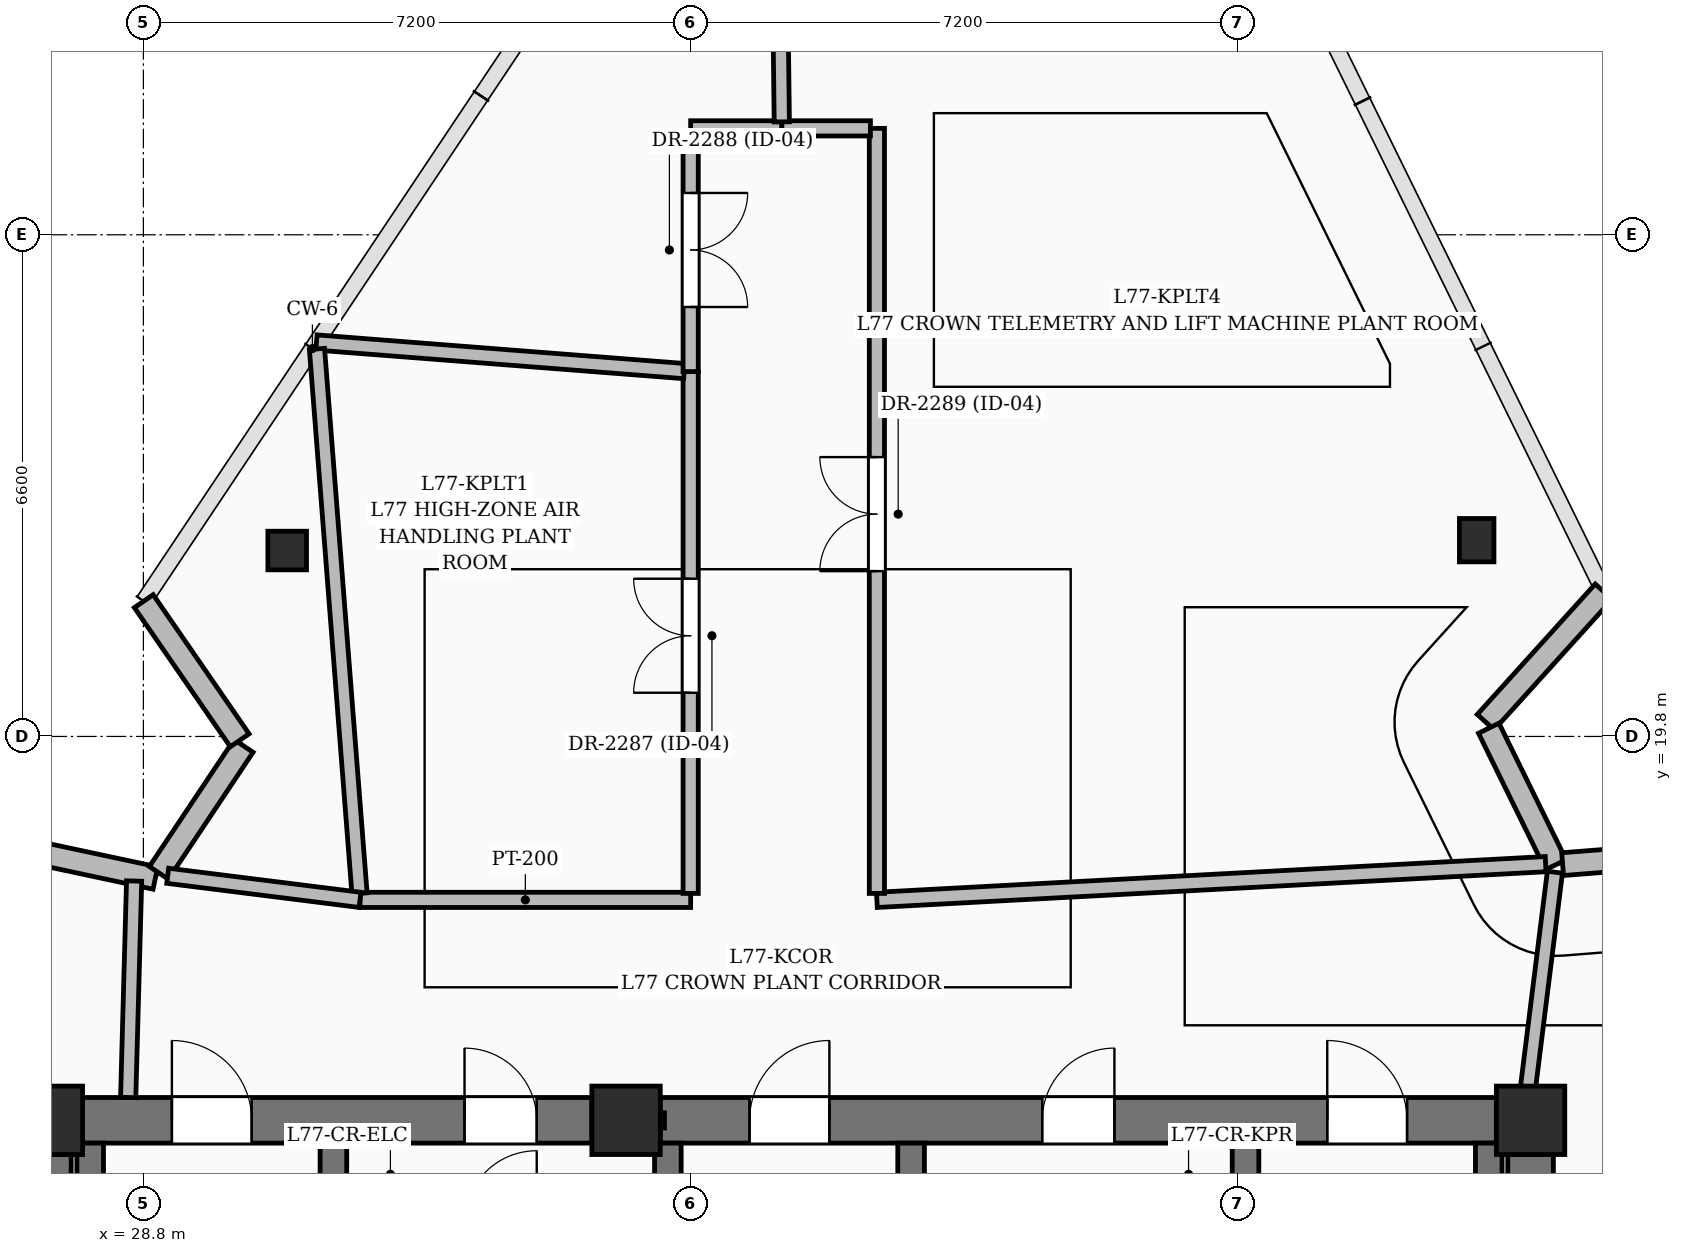
"""IFC4 building model, lengths in metres.
Left out: names, types, materials, properties, quantities, classifications, styles, units other than length and angle.
Written with IfcOpenShell. Run it as: python <this file> out.ifc"""

import sys

from ifc_helpers import new_model, si_unit, direction, frame, frame_2d, origin, origin_2d, place, context, subcontext, project, spatial, rectangle, hollow_circle, i_section, extrude, element, fill, save


model = new_model("IFC4")
c1 = context("Model", 3, precision=1e-05, world=origin(), true_north=direction((0.0, 1.0)))
c2 = subcontext(c1, "Body", "Model", "MODEL_VIEW")
j1 = project(units=[si_unit("LENGTHUNIT", "METRE"), si_unit("PLANEANGLEUNIT", "RADIAN")], contexts=[c1])
p1 = place(None, origin())
s1 = spatial("IfcSite", under=j1, at=p1, CompositionType="ELEMENT")
p2 = place(p1, origin())
s2 = spatial("IfcBuilding", under=s1, at=p2, CompositionType="ELEMENT")
p3 = place(p2, frame((0.0, 0.0, 298.5)))
s3 = spatial("IfcBuildingStorey", under=s2, at=p3, CompositionType="ELEMENT", Elevation=298.5)
for number, where, z_axis, x_axis in (
    (1, (27.55, 14.75, 0.0), (0.0, 0.0, 1.0), (1.0, 0.0, 0.0)),
    (2, (35.15, 14.75, 0.0), (0.0, 0.0, 1.0), (1.0, 0.0, 0.0)),
    (3, (47.05, 14.75, 0.0), (0.0, 0.0, 1.0), (1.0, 0.0, 0.0)),
):
    element("IfcColumn", number, at=place(p3, frame(where, z_axis=z_axis, x_axis=x_axis)), inside=s3, PredefinedType="COLUMN", context=c2, shape_type="SweptSolid", body=[
        extrude(rectangle(XDim=0.9, YDim=0.9, at=origin_2d()), origin(), (0.0, 0.0, 1.0), 4.0),
    ])
p4 = place(p3, frame((28.0, 14.75, 0.0), z_axis=(0.0, 0.0, 1.0), x_axis=(1.0, 0.0, 0.0)))
e4 = element("IfcWall", 4, at=p4, inside=s3, PredefinedType="SHEAR", context=c2, shape_type="SweptSolid", body=[
    extrude(rectangle(XDim=6.7, YDim=0.6, at=frame_2d((3.35, 0.0))), origin(), (0.0, 0.0, 1.0), 4.0),
])
p5 = place(p4, frame((1.175, 0.0, 0.0)))
e5 = element("IfcOpeningElement", 5, at=p5, cuts=e4, PredefinedType="OPENING", context=c2, shape_type="SweptSolid", body=[
    extrude(rectangle(XDim=1.05, YDim=2.15, at=frame_2d((0.525, 1.075))), frame((0.0, 0.31, 0.0), z_axis=(0.0, -1.0, 0.0), x_axis=(1.0, 0.0, 0.0)), (0.0, 0.0, 1.0), 0.62),
])
p6 = place(p4, frame((5.025, 0.0, 0.0)))
e6 = element("IfcOpeningElement", 6, at=p6, cuts=e4, PredefinedType="OPENING", context=c2, shape_type="SweptSolid", body=[
    extrude(rectangle(XDim=0.95, YDim=2.15, at=frame_2d((0.475, 1.075))), frame((0.0, 0.31, 0.0), z_axis=(0.0, -1.0, 0.0), x_axis=(1.0, 0.0, 0.0)), (0.0, 0.0, 1.0), 0.62),
])
p7 = place(p3, frame((35.6, 14.75, 0.0), z_axis=(0.0, 0.0, 1.0), x_axis=(1.0, 0.0, 0.0)))
e7 = element("IfcWall", 7, at=p7, inside=s3, PredefinedType="SHEAR", context=c2, shape_type="SweptSolid", body=[
    extrude(rectangle(XDim=11.0, YDim=0.6, at=frame_2d((5.5, 0.0))), origin(), (0.0, 0.0, 1.0), 4.0),
])
p8 = place(p7, frame((1.175, 0.0, 0.0)))
e8 = element("IfcOpeningElement", 8, at=p8, cuts=e7, PredefinedType="OPENING", context=c2, shape_type="SweptSolid", body=[
    extrude(rectangle(XDim=1.05, YDim=2.15, at=frame_2d((0.525, 1.075))), frame((0.0, 0.31, 0.0), z_axis=(0.0, -1.0, 0.0), x_axis=(1.0, 0.0, 0.0)), (0.0, 0.0, 1.0), 0.62),
])
p9 = place(p7, frame((8.775, 0.0, 0.0)))
e9 = element("IfcOpeningElement", 9, at=p9, cuts=e7, PredefinedType="OPENING", context=c2, shape_type="SweptSolid", body=[
    extrude(rectangle(XDim=1.05, YDim=2.15, at=frame_2d((0.525, 1.075))), frame((0.0, 0.31, 0.0), z_axis=(0.0, -1.0, 0.0), x_axis=(1.0, 0.0, 0.0)), (0.0, 0.0, 1.0), 0.62),
])
p10 = place(p7, frame((5.025, 0.0, 0.0)))
e10 = element("IfcOpeningElement", 10, at=p10, cuts=e7, PredefinedType="OPENING", context=c2, shape_type="SweptSolid", body=[
    extrude(rectangle(XDim=0.95, YDim=2.15, at=frame_2d((0.475, 1.075))), frame((0.0, 0.31, 0.0), z_axis=(0.0, -1.0, 0.0), x_axis=(1.0, 0.0, 0.0)), (0.0, 0.0, 1.0), 0.62),
])
for number, where, z_axis, x_axis in (
    (11, (27.55, 5.0, 0.0), (0.0, 0.0, 1.0), (0.0, 1.0, 0.0)),
    (12, (47.05, 5.0, 0.0), (0.0, 0.0, 1.0), (0.0, 1.0, 0.0)),
):
    element("IfcWall", number, at=place(p3, frame(where, z_axis=z_axis, x_axis=x_axis)), inside=s3, PredefinedType="SHEAR", context=c2, shape_type="SweptSolid", body=[
        extrude(rectangle(XDim=9.3, YDim=0.6, at=frame_2d((4.65, 0.0))), origin(), (0.0, 0.0, 1.0), 4.0),
    ])
p11 = place(p3, frame((28.1, 5.2, 0.0), z_axis=(0.0, 0.0, 1.0), x_axis=(0.0, 1.0, 0.0)))
e13 = element("IfcWall", 13, at=p11, inside=s3, PredefinedType="SOLIDWALL", context=c2, shape_type="SweptSolid", body=[
    extrude(rectangle(XDim=9.25, YDim=0.35, at=frame_2d((4.625, 0.0))), origin(), (0.0, 0.0, 1.0), 4.0),
])
p12 = place(p3, frame((31.3, 5.2, 0.0), z_axis=(0.0, 0.0, 1.0), x_axis=(0.0, 1.0, 0.0)))
e14 = element("IfcWall", 14, at=p12, inside=s3, PredefinedType="SOLIDWALL", context=c2, shape_type="SweptSolid", body=[
    extrude(rectangle(XDim=9.25, YDim=0.35, at=frame_2d((4.625, 0.0))), origin(), (0.0, 0.0, 1.0), 4.0),
])
p13 = place(p12, frame((6.95, 0.0, 0.0)))
e15 = element("IfcOpeningElement", 15, at=p13, cuts=e14, PredefinedType="OPENING", context=c2, shape_type="SweptSolid", body=[
    extrude(rectangle(XDim=1.0, YDim=2.15, at=frame_2d((0.5, 1.075))), frame((0.0, 0.185, 0.0), z_axis=(0.0, -1.0, 0.0), x_axis=(1.0, 0.0, 0.0)), (0.0, 0.0, 1.0), 0.37),
])
p14 = place(p3, frame((35.7, 5.2, 0.0), z_axis=(0.0, 0.0, 1.0), x_axis=(0.0, 1.0, 0.0)))
e16 = element("IfcWall", 16, at=p14, inside=s3, PredefinedType="SOLIDWALL", context=c2, shape_type="SweptSolid", body=[
    extrude(rectangle(XDim=9.25, YDim=0.35, at=frame_2d((4.625, 0.0))), origin(), (0.0, 0.0, 1.0), 4.0),
])
p15 = place(p14, frame((6.95, 0.0, 0.0)))
e17 = element("IfcOpeningElement", 17, at=p15, cuts=e16, PredefinedType="OPENING", context=c2, shape_type="SweptSolid", body=[
    extrude(rectangle(XDim=1.0, YDim=2.15, at=frame_2d((0.5, 1.075))), frame((0.0, 0.185, 0.0), z_axis=(0.0, -1.0, 0.0), x_axis=(1.0, 0.0, 0.0)), (0.0, 0.0, 1.0), 0.37),
])
p16 = place(p3, frame((38.9, 5.2, 0.0), z_axis=(0.0, 0.0, 1.0), x_axis=(0.0, 1.0, 0.0)))
e18 = element("IfcWall", 18, at=p16, inside=s3, PredefinedType="SOLIDWALL", context=c2, shape_type="SweptSolid", body=[
    extrude(rectangle(XDim=9.25, YDim=0.35, at=frame_2d((4.625, 0.0))), origin(), (0.0, 0.0, 1.0), 4.0),
])
p17 = place(p16, frame((6.95, 0.0, 0.0)))
e19 = element("IfcOpeningElement", 19, at=p17, cuts=e18, PredefinedType="OPENING", context=c2, shape_type="SweptSolid", body=[
    extrude(rectangle(XDim=1.0, YDim=2.15, at=frame_2d((0.5, 1.075))), frame((0.0, 0.185, 0.0), z_axis=(0.0, -1.0, 0.0), x_axis=(1.0, 0.0, 0.0)), (0.0, 0.0, 1.0), 0.37),
])
p18 = place(p3, frame((43.3, 5.2, 0.0), z_axis=(0.0, 0.0, 1.0), x_axis=(0.0, 1.0, 0.0)))
e20 = element("IfcWall", 20, at=p18, inside=s3, PredefinedType="SOLIDWALL", context=c2, shape_type="SweptSolid", body=[
    extrude(rectangle(XDim=9.25, YDim=0.35, at=frame_2d((4.625, 0.0))), origin(), (0.0, 0.0, 1.0), 4.0),
])
p19 = place(p18, frame((6.95, 0.0, 0.0)))
e21 = element("IfcOpeningElement", 21, at=p19, cuts=e20, PredefinedType="OPENING", context=c2, shape_type="SweptSolid", body=[
    extrude(rectangle(XDim=1.0, YDim=2.15, at=frame_2d((0.5, 1.075))), frame((0.0, 0.185, 0.0), z_axis=(0.0, -1.0, 0.0), x_axis=(1.0, 0.0, 0.0)), (0.0, 0.0, 1.0), 0.37),
])
p20 = place(p3, frame((46.5, 5.2, 0.0), z_axis=(0.0, 0.0, 1.0), x_axis=(0.0, 1.0, 0.0)))
e22 = element("IfcWall", 22, at=p20, inside=s3, PredefinedType="SOLIDWALL", context=c2, shape_type="SweptSolid", body=[
    extrude(rectangle(XDim=9.25, YDim=0.35, at=frame_2d((4.625, 0.0))), origin(), (0.0, 0.0, 1.0), 4.0),
])
p21 = place(p3, frame((46.341, 22.382, 0.0), z_axis=(0.0, 0.0, 1.0), x_axis=(1.0, 0.0, 0.0)))
e23 = element("IfcColumn", 23, at=p21, inside=s3, PredefinedType="COLUMN", context=c2, shape_type="SweptSolid", body=[
    extrude(i_section(OverallWidth=0.454, OverallDepth=0.57, WebThickness=0.078, FlangeThickness=0.094, FilletRadius=0.02, at=origin_2d()), origin(), (0.0, 0.0, 1.0), 4.0),
])
p22 = place(p3, frame((30.692, 22.246, 0.0), z_axis=(0.0, 0.0, 1.0), x_axis=(1.0, 0.0, 0.0)))
e24 = element("IfcColumn", 24, at=p22, inside=s3, PredefinedType="COLUMN", context=c2, shape_type="SweptSolid", body=[
    extrude(hollow_circle(Radius=0.254, WallThickness=0.016, at=origin_2d()), origin(), (0.0, 0.0, 1.0), 4.0),
])
p23 = place(p3, frame((26.695, 18.42, 0.0), z_axis=(0.0, 0.0, 1.0), x_axis=(0.977979629917, -0.208700367675, 0.0)))
e25 = element("IfcWall", 25, at=p23, inside=s3, PredefinedType="SOLIDWALL", context=c2, shape_type="SweptSolid", body=[
    extrude(rectangle(XDim=2.314, YDim=0.3, at=frame_2d((1.157, 0.0))), origin(), (0.0, 0.0, 1.0), 2.982),
])
p24 = place(p3, frame((29.003, 18.005, 0.0), z_axis=(0.0, 0.0, 1.0), x_axis=(0.555121061255, 0.831769563852, 0.0)))
e26 = element("IfcWall", 26, at=p24, inside=s3, PredefinedType="SOLIDWALL", context=c2, shape_type="SweptSolid", body=[
    extrude(rectangle(XDim=2.008, YDim=0.3, at=frame_2d((1.004, 0.0))), origin(), (0.0, 0.0, 1.0), 3.04),
])
p25 = place(p3, frame((30.067, 19.749, 0.0), z_axis=(0.0, 0.0, 1.0), x_axis=(-0.567478945793, 0.823387907418, 0.0)))
e27 = element("IfcWall", 27, at=p25, inside=s3, PredefinedType="SOLIDWALL", context=c2, shape_type="SweptSolid", body=[
    extrude(rectangle(XDim=2.224, YDim=0.3, at=frame_2d((1.112, 0.0))), origin(), (0.0, 0.0, 1.0), 2.982),
])
p26 = place(p3, frame((48.012, 21.705, 0.0), z_axis=(0.0, 0.0, 1.0), x_axis=(-0.670764114694, -0.741670750697, 0.0)))
e28 = element("IfcWall", 28, at=p26, inside=s3, PredefinedType="SOLIDWALL", context=c2, shape_type="SweptSolid", body=[
    extrude(rectangle(XDim=2.314, YDim=0.3, at=frame_2d((1.157, 0.0))), origin(), (0.0, 0.0, 1.0), 2.982),
])
p27 = place(p3, frame((46.5, 19.908, 0.0), z_axis=(0.0, 0.0, 1.0), x_axis=(0.441100522221, -0.897457703346, 0.0)))
e29 = element("IfcWall", 29, at=p27, inside=s3, PredefinedType="SOLIDWALL", context=c2, shape_type="SweptSolid", body=[
    extrude(rectangle(XDim=2.0, YDim=0.3, at=frame_2d((1.0, 0.0))), origin(), (0.0, 0.0, 1.0), 3.04),
])
p28 = place(p3, frame((47.472, 18.12, 0.0), z_axis=(0.0, 0.0, 1.0), x_axis=(0.99690404097, 0.078627813762, 0.0)))
e30 = element("IfcWall", 30, at=p28, inside=s3, PredefinedType="SOLIDWALL", context=c2, shape_type="SweptSolid", body=[
    extrude(rectangle(XDim=2.223, YDim=0.3, at=frame_2d((1.112, 0.0))), origin(), (0.0, 0.0, 1.0), 2.982),
])
p29 = place(p3, frame((34.72, 14.75, 0.0), z_axis=(0.0, 0.0, 1.0), x_axis=(1.0, 0.0, 0.0)))
e31 = element("IfcWall", 31, at=p29, inside=s3, PredefinedType="PARTITIONING", context=c2, shape_type="SweptSolid", body=[
    extrude(rectangle(XDim=0.935, YDim=0.2, at=frame_2d((0.468, 0.0))), origin(), (0.0, 0.0, 1.0), 2.885),
])
p30 = place(p3, frame((31.65, 17.65, 0.0), z_axis=(0.0, 0.0, 1.0), x_axis=(1.0, 0.0, 0.0)))
e32 = element("IfcWall", 32, at=p30, inside=s3, PredefinedType="PARTITIONING", context=c2, shape_type="SweptSolid", body=[
    extrude(rectangle(XDim=4.35, YDim=0.2, at=frame_2d((2.175, 0.0))), origin(), (0.0, 0.0, 1.0), 3.035),
])
p31 = place(p3, frame((36.0, 17.735, 0.0), z_axis=(0.0, 0.0, 1.0), x_axis=(0.0, 1.0, 0.0)))
e33 = element("IfcWall", 33, at=p31, inside=s3, PredefinedType="PARTITIONING", context=c2, shape_type="SweptSolid", body=[
    extrude(rectangle(XDim=6.865, YDim=0.2, at=frame_2d((3.433, 0.0))), origin(), (0.0, 0.0, 1.0), 3.062),
])
p32 = place(p31, frame((2.64, 0.0, 0.0)))
e34 = element("IfcOpeningElement", 34, at=p32, cuts=e33, PredefinedType="OPENING", context=c2, shape_type="SweptSolid", body=[
    extrude(rectangle(XDim=1.5, YDim=2.2, at=frame_2d((0.75, 1.1))), frame((0.0, 0.11, 0.0), z_axis=(0.0, -1.0, 0.0), x_axis=(1.0, 0.0, 0.0)), (0.0, 0.0, 1.0), 0.22),
])
p33 = place(p3, frame((35.915, 24.607, 0.0), z_axis=(0.0, 0.0, 1.0), x_axis=(-0.996990518467, 0.077523584063, 0.0)))
e35 = element("IfcWall", 35, at=p33, inside=s3, PredefinedType="PARTITIONING", context=c2, shape_type="SweptSolid", body=[
    extrude(rectangle(XDim=4.853, YDim=0.2, at=frame_2d((2.427, 0.0))), origin(), (0.0, 0.0, 1.0), 2.977),
])
p34 = place(p3, frame((31.083, 24.898, 0.0), z_axis=(0.0, 0.0, 1.0), x_axis=(0.077909829575, -0.996960409673, 0.0)))
e36 = element("IfcWall", 36, at=p34, inside=s3, PredefinedType="PARTITIONING", context=c2, shape_type="SweptSolid", body=[
    extrude(rectangle(XDim=7.185, YDim=0.2, at=frame_2d((3.593, 0.0))), origin(), (0.0, 0.0, 1.0), 2.977),
])
p35 = place(p3, frame((31.65, 17.65, 0.0), z_axis=(0.0, 0.0, 1.0), x_axis=(-0.992233618203, 0.124388290875, 0.0)))
e37 = element("IfcWall", 37, at=p35, inside=s3, PredefinedType="PARTITIONING", context=c2, shape_type="SweptSolid", body=[
    extrude(rectangle(XDim=2.55, YDim=0.2, at=frame_2d((1.275, 0.0))), origin(), (0.0, 0.0, 1.0), 3.035),
])
p36 = place(p3, frame((28.678, 17.898, 0.0), z_axis=(0.0, 0.0, 1.0), x_axis=(-0.027336543978, -0.999626286851, 0.0)))
e38 = element("IfcWall", 38, at=p36, inside=s3, PredefinedType="PARTITIONING", context=c2, shape_type="SweptSolid", body=[
    extrude(rectangle(XDim=2.849, YDim=0.2, at=frame_2d((1.424, 0.0))), origin(), (0.0, 0.0, 1.0), 3.035),
])
p37 = place(p3, frame((37.2, 27.8, 0.0), z_axis=(0.0, 0.0, 1.0), x_axis=(-1.0, 0.0, 0.0)))
e39 = element("IfcWall", 39, at=p37, inside=s3, PredefinedType="PARTITIONING", context=c2, shape_type="SweptSolid", body=[
    extrude(rectangle(XDim=1.2, YDim=0.2, at=frame_2d((0.6, 0.0))), origin(), (0.0, 0.0, 1.0), 3.7),
])
p38 = place(p3, frame((36.0, 27.715, 0.0), z_axis=(0.0, 0.0, 1.0), x_axis=(0.0, -1.0, 0.0)))
e40 = element("IfcWall", 40, at=p38, inside=s3, PredefinedType="PARTITIONING", context=c2, shape_type="SweptSolid", body=[
    extrude(rectangle(XDim=3.115, YDim=0.2, at=frame_2d((1.558, 0.0))), origin(), (0.0, 0.0, 1.0), 3.062),
])
p39 = place(p38, frame((0.765, 0.0, 0.0)))
e41 = element("IfcOpeningElement", 41, at=p39, cuts=e40, PredefinedType="OPENING", context=c2, shape_type="SweptSolid", body=[
    extrude(rectangle(XDim=1.5, YDim=2.2, at=frame_2d((0.75, 1.1))), frame((0.0, 0.11, 0.0), z_axis=(0.0, -1.0, 0.0), x_axis=(1.0, 0.0, 0.0)), (0.0, 0.0, 1.0), 0.22),
])
p40 = place(p3, frame((47.0, 15.05, 0.0), z_axis=(0.0, 0.0, 1.0), x_axis=(0.123914013707, 0.992292959366, 0.0)))
e42 = element("IfcWall", 42, at=p40, inside=s3, PredefinedType="PARTITIONING", context=c2, shape_type="SweptSolid", body=[
    extrude(rectangle(XDim=2.987, YDim=0.2, at=frame_2d((1.493, 0.0))), origin(), (0.0, 0.0, 1.0), 3.035),
])
p41 = place(p3, frame((47.248, 18.12, 0.0), z_axis=(0.0, 0.0, 1.0), x_axis=(-0.998574864544, -0.05336890388, 0.0)))
e43 = element("IfcWall", 43, at=p41, inside=s3, PredefinedType="PARTITIONING", context=c2, shape_type="SweptSolid", body=[
    extrude(rectangle(XDim=8.811, YDim=0.2, at=frame_2d((4.405, 0.0))), origin(), (0.0, 0.0, 1.0), 3.035),
])
p42 = place(p3, frame((38.45, 17.735, 0.0), z_axis=(0.0, 0.0, 1.0), x_axis=(0.0, 1.0, 0.0)))
e44 = element("IfcWall", 44, at=p42, inside=s3, PredefinedType="PARTITIONING", context=c2, shape_type="SweptSolid", body=[
    extrude(rectangle(XDim=10.065, YDim=0.2, at=frame_2d((5.032, 0.0))), origin(), (0.0, 0.0, 1.0), 3.035),
])
p43 = place(p42, frame((4.24, 0.0, 0.0)))
e45 = element("IfcOpeningElement", 45, at=p43, cuts=e44, PredefinedType="OPENING", context=c2, shape_type="SweptSolid", body=[
    extrude(rectangle(XDim=1.5, YDim=2.2, at=frame_2d((0.75, 1.1))), frame((0.0, 0.11, 0.0), z_axis=(0.0, -1.0, 0.0), x_axis=(1.0, 0.0, 0.0)), (0.0, 0.0, 1.0), 0.22),
])
p44 = place(p3, frame((38.365, 27.8, 0.0), z_axis=(0.0, 0.0, 1.0), x_axis=(-1.0, 0.0, 0.0)))
e46 = element("IfcWall", 46, at=p44, inside=s3, PredefinedType="PARTITIONING", context=c2, shape_type="SweptSolid", body=[
    extrude(rectangle(XDim=1.165, YDim=0.2, at=frame_2d((0.583, 0.0))), origin(), (0.0, 0.0, 1.0), 3.7),
])
p45 = place(p3, frame((37.199, 27.885, 0.0), z_axis=(0.0, 0.0, 1.0), x_axis=(-0.012174390166, 0.999925889366, 0.0)))
e47 = element("IfcWall", 47, at=p45, inside=s3, PredefinedType="PARTITIONING", context=c2, shape_type="SweptSolid", body=[
    extrude(rectangle(XDim=6.156, YDim=0.2, at=frame_2d((3.078, 0.0))), origin(), (0.0, 0.0, 1.0), 2.977),
])
p46 = place(p5, origin())
e48 = element("IfcDoor", 48, at=p46, inside=s3, OperationType="SINGLE_SWING_LEFT", PredefinedType="DOOR", context=c2, shape_type="SweptSolid", body=[
    extrude(rectangle(XDim=1.05, YDim=2.15, at=frame_2d((0.525, 1.075))), frame((0.0, 0.025, 0.0), z_axis=(0.0, -1.0, 0.0), x_axis=(1.0, 0.0, 0.0)), (0.0, 0.0, 1.0), 0.05),
])
fill(e5, e48)
p47 = place(p8, origin())
e49 = element("IfcDoor", 49, at=p47, inside=s3, OperationType="SINGLE_SWING_RIGHT", PredefinedType="DOOR", context=c2, shape_type="SweptSolid", body=[
    extrude(rectangle(XDim=1.05, YDim=2.15, at=frame_2d((0.525, 1.075))), frame((0.0, 0.025, 0.0), z_axis=(0.0, -1.0, 0.0), x_axis=(1.0, 0.0, 0.0)), (0.0, 0.0, 1.0), 0.05),
])
fill(e8, e49)
p48 = place(p9, origin())
e50 = element("IfcDoor", 50, at=p48, inside=s3, OperationType="SINGLE_SWING_LEFT", PredefinedType="DOOR", context=c2, shape_type="SweptSolid", body=[
    extrude(rectangle(XDim=1.05, YDim=2.15, at=frame_2d((0.525, 1.075))), frame((0.0, 0.025, 0.0), z_axis=(0.0, -1.0, 0.0), x_axis=(1.0, 0.0, 0.0)), (0.0, 0.0, 1.0), 0.05),
])
fill(e9, e50)
p49 = place(p6, origin())
e51 = element("IfcDoor", 51, at=p49, inside=s3, OperationType="SINGLE_SWING_LEFT", PredefinedType="DOOR", context=c2, shape_type="SweptSolid", body=[
    extrude(rectangle(XDim=0.95, YDim=2.15, at=frame_2d((0.475, 1.075))), frame((0.0, 0.025, 0.0), z_axis=(0.0, -1.0, 0.0), x_axis=(1.0, 0.0, 0.0)), (0.0, 0.0, 1.0), 0.05),
])
fill(e6, e51)
p50 = place(p10, origin())
e52 = element("IfcDoor", 52, at=p50, inside=s3, OperationType="SINGLE_SWING_RIGHT", PredefinedType="DOOR", context=c2, shape_type="SweptSolid", body=[
    extrude(rectangle(XDim=0.95, YDim=2.15, at=frame_2d((0.475, 1.075))), frame((0.0, 0.025, 0.0), z_axis=(0.0, -1.0, 0.0), x_axis=(1.0, 0.0, 0.0)), (0.0, 0.0, 1.0), 0.05),
])
fill(e10, e52)
p51 = place(p32, origin())
e53 = element("IfcDoor", 53, at=p51, inside=s3, OperationType="DOUBLE_DOOR_SINGLE_SWING", PredefinedType="DOOR", context=c2, shape_type="SweptSolid", body=[
    extrude(rectangle(XDim=1.5, YDim=2.2, at=frame_2d((0.75, 1.1))), frame((0.0, 0.025, 0.0), z_axis=(0.0, -1.0, 0.0), x_axis=(1.0, 0.0, 0.0)), (0.0, 0.0, 1.0), 0.05),
])
fill(e34, e53)
p52 = place(p39, origin())
e54 = element("IfcDoor", 54, at=p52, inside=s3, OperationType="DOUBLE_DOOR_SINGLE_SWING", PredefinedType="DOOR", context=c2, shape_type="SweptSolid", body=[
    extrude(rectangle(XDim=1.5, YDim=2.2, at=frame_2d((0.75, 1.1))), frame((0.0, 0.025, 0.0), z_axis=(0.0, -1.0, 0.0), x_axis=(1.0, 0.0, 0.0)), (0.0, 0.0, 1.0), 0.05),
])
fill(e41, e54)
p53 = place(p43, origin())
e55 = element("IfcDoor", 55, at=p53, inside=s3, OperationType="DOUBLE_DOOR_SINGLE_SWING", PredefinedType="DOOR", context=c2, shape_type="SweptSolid", body=[
    extrude(rectangle(XDim=1.5, YDim=2.2, at=frame_2d((0.75, 1.1))), frame((0.0, 0.025, 0.0), z_axis=(0.0, -1.0, 0.0), x_axis=(1.0, 0.0, 0.0)), (0.0, 0.0, 1.0), 0.05),
])
fill(e45, e55)
save(model, sys.argv[1])
